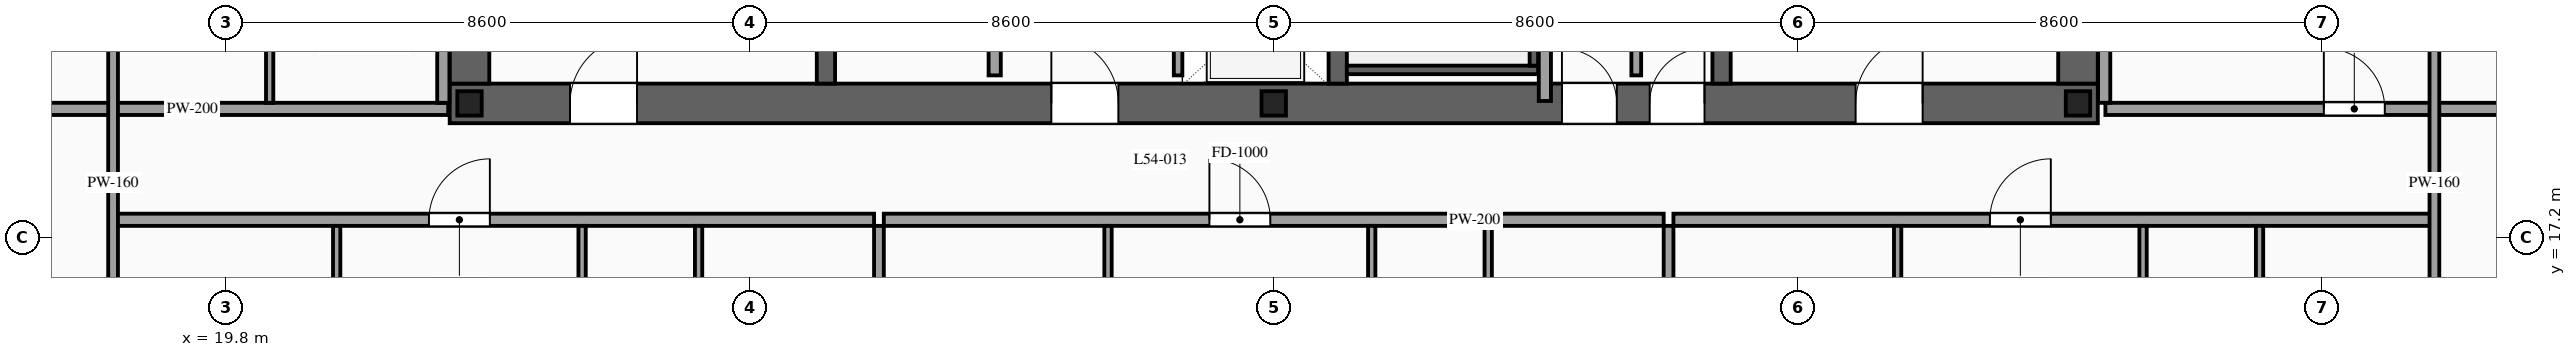
"""IFC4 building model, lengths in metres.
Left out: names, types, materials, properties, quantities, classifications, styles, units other than length and angle.
Written with IfcOpenShell. Run it as: python <this file> out.ifc"""

import sys

from ifc_helpers import new_model, si_unit, direction, frame, frame_2d, origin, origin_2d, place, context, subcontext, project, spatial, rectangle, i_section, extrude, source, transform, mapped, element, fill, save


model = new_model("IFC4")
c1 = context("Model", 3, precision=1e-05, world=origin(), true_north=direction((0.0, 1.0)))
c2 = subcontext(c1, "Body", "Model", "MODEL_VIEW")
j1 = project(units=[si_unit("LENGTHUNIT", "METRE"), si_unit("PLANEANGLEUNIT", "RADIAN")], contexts=[c1])
p1 = place(None, origin())
s1 = spatial("IfcSite", under=j1, at=p1, CompositionType="ELEMENT")
p2 = place(p1, origin())
s2 = spatial("IfcBuilding", under=s1, at=p2, CompositionType="ELEMENT")
p3 = place(p2, frame((0.0, 0.0, 205.5)))
s3 = spatial("IfcBuildingStorey", under=s2, at=p3, CompositionType="ELEMENT", Elevation=205.5)
p4 = place(p3, frame((23.475, 19.4, 0.0), z_axis=(0.0, 0.0, 1.0), x_axis=(1.0, 0.0, 0.0)))
e1 = element("IfcWall", 1, at=p4, inside=s3, PredefinedType="SHEAR", context=c2, shape_type="SweptSolid", body=[
    extrude(rectangle(XDim=27.05, YDim=0.65, at=frame_2d((13.525, 0.0))), origin(), (0.0, 0.0, 1.0), 3.5),
])
p5 = place(p4, frame((1.975, 0.0, 0.0)))
e2 = element("IfcOpeningElement", 2, at=p5, cuts=e1, PredefinedType="OPENING", context=c2, shape_type="SweptSolid", body=[
    extrude(rectangle(XDim=1.1, YDim=2.2, at=frame_2d((0.55, 1.1))), frame((0.0, 0.34, 0.0), z_axis=(0.0, -1.0, 0.0), x_axis=(1.0, 0.0, 0.0)), (0.0, 0.0, 1.0), 0.68),
])
p6 = place(p4, frame((9.875, 0.0, 0.0)))
e3 = element("IfcOpeningElement", 3, at=p6, cuts=e1, PredefinedType="OPENING", context=c2, shape_type="SweptSolid", body=[
    extrude(rectangle(XDim=1.1, YDim=2.2, at=frame_2d((0.55, 1.1))), frame((0.0, 0.34, 0.0), z_axis=(0.0, -1.0, 0.0), x_axis=(1.0, 0.0, 0.0)), (0.0, 0.0, 1.0), 0.68),
])
p7 = place(p4, frame((23.075, 0.0, 0.0)))
e4 = element("IfcOpeningElement", 4, at=p7, cuts=e1, PredefinedType="OPENING", context=c2, shape_type="SweptSolid", body=[
    extrude(rectangle(XDim=1.1, YDim=2.2, at=frame_2d((0.55, 1.1))), frame((0.0, 0.34, 0.0), z_axis=(0.0, -1.0, 0.0), x_axis=(1.0, 0.0, 0.0)), (0.0, 0.0, 1.0), 0.68),
])
p8 = place(p4, frame((19.695, 0.0, 0.0)))
e5 = element("IfcOpeningElement", 5, at=p8, cuts=e1, PredefinedType="OPENING", context=c2, shape_type="SweptSolid", body=[
    extrude(rectangle(XDim=0.9, YDim=2.15, at=frame_2d((0.45, 1.075))), frame((0.0, 0.34, 0.0), z_axis=(0.0, -1.0, 0.0), x_axis=(1.0, 0.0, 0.0)), (0.0, 0.0, 1.0), 0.68),
])
p9 = place(p4, frame((18.255, 0.0, 0.0)))
e6 = element("IfcOpeningElement", 6, at=p9, cuts=e1, PredefinedType="OPENING", context=c2, shape_type="SweptSolid", body=[
    extrude(rectangle(XDim=0.9, YDim=2.15, at=frame_2d((0.45, 1.075))), frame((0.0, 0.34, 0.0), z_axis=(0.0, -1.0, 0.0), x_axis=(1.0, 0.0, 0.0)), (0.0, 0.0, 1.0), 0.68),
])
m1 = source(origin(), c2, "Body", "SweptSolid", [
    extrude(rectangle(XDim=12.15, YDim=0.65, at=frame_2d((6.075, 0.0))), origin(), (0.0, 0.0, 1.0), 3.5),
])
for number, where, z_axis, x_axis in (
    (7, (23.8, 19.725, 0.0), (0.0, 0.0, 1.0), (0.0, 1.0, 0.0)),
    (8, (50.2, 19.725, 0.0), (0.0, 0.0, 1.0), (0.0, 1.0, 0.0)),
):
    element("IfcWall", number, at=place(p3, frame(where, z_axis=z_axis, x_axis=x_axis)), inside=s3, PredefinedType="SHEAR", context=c2, shape_type="MappedRepresentation", body=[
        mapped(m1, transform((0.0, 0.0, 0.0), scale=1.0)),
    ])
m2 = source(origin(), c2, "Body", "SweptSolid", [
    extrude(rectangle(XDim=12.15, YDim=0.3, at=frame_2d((6.075, 0.0))), origin(), (0.0, 0.0, 1.0), 3.5),
])
for number, where, z_axis, x_axis in (
    (9, (29.65, 19.725, 0.0), (0.0, 0.0, 1.0), (0.0, 1.0, 0.0)),
    (10, (38.05, 19.725, 0.0), (0.0, 0.0, 1.0), (0.0, 1.0, 0.0)),
    (11, (44.35, 19.725, 0.0), (0.0, 0.0, 1.0), (0.0, 1.0, 0.0)),
):
    element("IfcWall", number, at=place(p3, frame(where, z_axis=z_axis, x_axis=x_axis)), inside=s3, PredefinedType="SOLIDWALL", context=c2, shape_type="MappedRepresentation", body=[
        mapped(m2, transform((0.0, 0.0, 0.0), scale=1.0)),
    ])
m3 = source(origin(), c2, "Body", "SweptSolid", [
    extrude(i_section(OverallWidth=0.4, OverallDepth=0.4, WebThickness=0.013, FlangeThickness=0.021, at=origin_2d()), origin(), (0.0, 0.0, 1.0), 3.5),
])
for number, where, z_axis, x_axis in (
    (12, (23.8, 19.4, 0.0), (0.0, 0.0, 1.0), (1.0, 0.0, 0.0)),
    (13, (37.0, 19.4, 0.0), (0.0, 0.0, 1.0), (1.0, 0.0, 0.0)),
    (14, (50.2, 19.4, 0.0), (0.0, 0.0, 1.0), (1.0, 0.0, 0.0)),
):
    element("IfcColumn", number, at=place(p3, frame(where, z_axis=z_axis, x_axis=x_axis)), inside=s3, PredefinedType="COLUMN", context=c2, shape_type="MappedRepresentation", body=[
        mapped(m3, transform((0.0, 0.0, 0.0), scale=1.0)),
    ])
p10 = place(p3, frame((35.43, 19.86, 0.0), z_axis=(0.0, 0.0, 1.0), x_axis=(0.0, 1.0, 0.0)))
e15 = element("IfcWall", 15, at=p10, inside=s3, PredefinedType="SOLIDWALL", context=c2, shape_type="SweptSolid", body=[
    extrude(rectangle(XDim=2.04, YDim=0.14, at=frame_2d((1.02, 0.0))), origin(), (0.0, 0.0, 1.0), 3.28),
])
p11 = place(p10, frame((0.47, 0.0, 0.0)))
e16 = element("IfcOpeningElement", 16, at=p11, cuts=e15, PredefinedType="OPENING", context=c2, shape_type="SweptSolid", body=[
    extrude(rectangle(XDim=1.1, YDim=2.2, at=frame_2d((0.55, 1.1))), frame((0.0, 0.085, 0.0), z_axis=(0.0, -1.0, 0.0), x_axis=(1.0, 0.0, 0.0)), (0.0, 0.0, 1.0), 0.17),
])
m4 = source(origin(), c2, "Body", "SweptSolid", [
    extrude(rectangle(XDim=3.14, YDim=0.14, at=frame_2d((1.57, 0.0))), origin(), (0.0, 0.0, 1.0), 3.28),
])
p12 = place(p3, frame((38.2, 19.95, 0.0), z_axis=(0.0, 0.0, 1.0), x_axis=(1.0, 0.0, 0.0)))
e17 = element("IfcWall", 17, at=p12, inside=s3, PredefinedType="SOLIDWALL", context=c2, shape_type="MappedRepresentation", body=[
    mapped(m4, transform((0.0, 0.0, 0.0), scale=1.0)),
])
m5 = source(origin(), c2, "Body", "SweptSolid", [
    extrude(rectangle(XDim=8.94, YDim=0.14, at=frame_2d((4.47, 0.0))), origin(), (0.0, 0.0, 1.0), 3.28),
])
p13 = place(p3, frame((41.27, 20.02, 0.0), z_axis=(0.0, 0.0, 1.0), x_axis=(0.0, 1.0, 0.0)))
e18 = element("IfcWall", 18, at=p13, inside=s3, PredefinedType="SOLIDWALL", context=c2, shape_type="MappedRepresentation", body=[
    mapped(m5, transform((0.0, 0.0, 0.0), scale=1.0)),
])
p14 = place(p3, frame((32.42, 19.86, 0.0), z_axis=(0.0, 0.0, 1.0), x_axis=(0.0, 1.0, 0.0)))
e19 = element("IfcWall", 19, at=p14, inside=s3, PredefinedType="PARTITIONING", context=c2, shape_type="SweptSolid", body=[
    extrude(rectangle(XDim=11.88, YDim=0.2, at=frame_2d((5.94, 0.0))), origin(), (0.0, 0.0, 1.0), 3.28),
])
p15 = place(p14, frame((5.49, 0.0, 0.0)))
e20 = element("IfcOpeningElement", 20, at=p15, cuts=e19, PredefinedType="OPENING", context=c2, shape_type="SweptSolid", body=[
    extrude(rectangle(XDim=0.9, YDim=2.15, at=frame_2d((0.45, 1.075))), frame((0.0, 0.115, 0.0), z_axis=(0.0, -1.0, 0.0), x_axis=(1.0, 0.0, 0.0)), (0.0, 0.0, 1.0), 0.23),
])
m6 = source(origin(), c2, "Body", "SweptSolid", [
    extrude(rectangle(XDim=1.34, YDim=0.16, at=frame_2d((0.67, 0.0))), origin(), (0.0, 0.0, 1.0), 3.28),
])
p16 = place(p3, frame((42.95, 19.86, 0.0), z_axis=(0.0, 0.0, 1.0), x_axis=(0.0, 1.0, 0.0)))
e21 = element("IfcWall", 21, at=p16, inside=s3, PredefinedType="PARTITIONING", context=c2, shape_type="MappedRepresentation", body=[
    mapped(m6, transform((0.0, 0.0, 0.0), scale=1.0)),
])
m7 = source(origin(), c2, "Body", "SweptSolid", [
    extrude(rectangle(XDim=12.72, YDim=0.2, at=frame_2d((6.36, 0.0))), origin(), (0.0, 0.0, 1.0), 3.28),
])
p17 = place(p3, frame((41.45, 19.44, 0.0), z_axis=(0.0, 0.0, 1.0), x_axis=(0.0, 1.0, 0.0)))
e22 = element("IfcWall", 22, at=p17, inside=s3, PredefinedType="PARTITIONING", context=c2, shape_type="MappedRepresentation", body=[
    mapped(m7, transform((0.0, 0.0, 0.0), scale=1.0)),
])
p18 = place(p3, frame((17.94, 17.49, 0.0), z_axis=(0.0, 0.0, 1.0), x_axis=(1.0, 0.0, 0.0)))
e23 = element("IfcWall", 23, at=p18, inside=s3, PredefinedType="PARTITIONING", context=c2, shape_type="SweptSolid", body=[
    extrude(rectangle(XDim=12.5, YDim=0.2, at=frame_2d((6.25, 0.0))), origin(), (0.0, 0.0, 1.0), 3.28),
])
p19 = place(p18, frame((5.194, 0.0, 0.0)))
e24 = element("IfcOpeningElement", 24, at=p19, cuts=e23, PredefinedType="OPENING", context=c2, shape_type="SweptSolid", body=[
    extrude(rectangle(XDim=1.0, YDim=2.2, at=frame_2d((0.5, 1.1))), frame((0.0, 0.115, 0.0), z_axis=(0.0, -1.0, 0.0), x_axis=(1.0, 0.0, 0.0)), (0.0, 0.0, 1.0), 0.23),
])
m8 = source(origin(), c2, "Body", "SweptSolid", [
    extrude(rectangle(XDim=13.54, YDim=0.16, at=frame_2d((6.77, 0.0))), origin(), (0.0, 0.0, 1.0), 3.28),
])
p20 = place(p3, frame((30.52, 3.85, 0.0), z_axis=(0.0, 0.0, 1.0), x_axis=(0.0, 1.0, 0.0)))
e25 = element("IfcWall", 25, at=p20, inside=s3, PredefinedType="PARTITIONING", context=c2, shape_type="MappedRepresentation", body=[
    mapped(m8, transform((0.0, 0.0, 0.0), scale=1.0)),
])
m9 = source(origin(), c2, "Body", "SweptSolid", [
    extrude(rectangle(XDim=5.61, YDim=0.12, at=frame_2d((2.805, 0.0))), origin(), (0.0, 0.0, 1.0), 3.28),
])
p21 = place(p3, frame((21.62, 11.78, 0.0), z_axis=(0.0, 0.0, 1.0), x_axis=(0.0, 1.0, 0.0)))
e26 = element("IfcWall", 26, at=p21, inside=s3, PredefinedType="PARTITIONING", context=c2, shape_type="MappedRepresentation", body=[
    mapped(m9, transform((0.0, 0.0, 0.0), scale=1.0)),
])
p22 = place(p3, frame((27.56, 11.78, 0.0), z_axis=(0.0, 0.0, 1.0), x_axis=(0.0, 1.0, 0.0)))
e27 = element("IfcWall", 27, at=p22, inside=s3, PredefinedType="PARTITIONING", context=c2, shape_type="SweptSolid", body=[
    extrude(rectangle(XDim=5.61, YDim=0.12, at=frame_2d((2.805, 0.0))), origin(), (0.0, 0.0, 1.0), 3.28),
])
p23 = place(p22, frame((2.38, 0.0, 0.0)))
e28 = element("IfcOpeningElement", 28, at=p23, cuts=e27, PredefinedType="OPENING", context=c2, shape_type="SweptSolid", body=[
    extrude(rectangle(XDim=0.85, YDim=2.1, at=frame_2d((0.425, 1.05))), frame((0.0, 0.075, 0.0), z_axis=(0.0, -1.0, 0.0), x_axis=(1.0, 0.0, 0.0)), (0.0, 0.0, 1.0), 0.15),
])
p24 = place(p3, frame((25.648, 11.78, 0.0), z_axis=(0.0, 0.0, 1.0), x_axis=(0.0, 1.0, 0.0)))
e29 = element("IfcWall", 29, at=p24, inside=s3, PredefinedType="PARTITIONING", context=c2, shape_type="SweptSolid", body=[
    extrude(rectangle(XDim=5.61, YDim=0.12, at=frame_2d((2.805, 0.0))), origin(), (0.0, 0.0, 1.0), 3.28),
])
p25 = place(p24, frame((2.38, 0.0, 0.0)))
e30 = element("IfcOpeningElement", 30, at=p25, cuts=e29, PredefinedType="OPENING", context=c2, shape_type="SweptSolid", body=[
    extrude(rectangle(XDim=0.85, YDim=2.1, at=frame_2d((0.425, 1.05))), frame((0.0, 0.075, 0.0), z_axis=(0.0, -1.0, 0.0), x_axis=(1.0, 0.0, 0.0)), (0.0, 0.0, 1.0), 0.15),
])
p26 = place(p3, frame((30.6, 17.49, 0.0), z_axis=(0.0, 0.0, 1.0), x_axis=(1.0, 0.0, 0.0)))
e31 = element("IfcWall", 31, at=p26, inside=s3, PredefinedType="PARTITIONING", context=c2, shape_type="SweptSolid", body=[
    extrude(rectangle(XDim=12.8, YDim=0.2, at=frame_2d((6.4, 0.0))), origin(), (0.0, 0.0, 1.0), 3.28),
])
p27 = place(p26, frame((5.344, 0.0, 0.0)))
e32 = element("IfcOpeningElement", 32, at=p27, cuts=e31, PredefinedType="OPENING", context=c2, shape_type="SweptSolid", body=[
    extrude(rectangle(XDim=1.0, YDim=2.2, at=frame_2d((0.5, 1.1))), frame((0.0, 0.115, 0.0), z_axis=(0.0, -1.0, 0.0), x_axis=(1.0, 0.0, 0.0)), (0.0, 0.0, 1.0), 0.23),
])
p28 = place(p3, frame((43.48, 3.85, 0.0), z_axis=(0.0, 0.0, 1.0), x_axis=(0.0, 1.0, 0.0)))
e33 = element("IfcWall", 33, at=p28, inside=s3, PredefinedType="PARTITIONING", context=c2, shape_type="MappedRepresentation", body=[
    mapped(m8, transform((0.0, 0.0, 0.0), scale=1.0)),
])
p29 = place(p3, frame((34.28, 11.78, 0.0), z_axis=(0.0, 0.0, 1.0), x_axis=(0.0, 1.0, 0.0)))
e34 = element("IfcWall", 34, at=p29, inside=s3, PredefinedType="PARTITIONING", context=c2, shape_type="MappedRepresentation", body=[
    mapped(m9, transform((0.0, 0.0, 0.0), scale=1.0)),
])
p30 = place(p3, frame((40.52, 11.78, 0.0), z_axis=(0.0, 0.0, 1.0), x_axis=(0.0, 1.0, 0.0)))
e35 = element("IfcWall", 35, at=p30, inside=s3, PredefinedType="PARTITIONING", context=c2, shape_type="SweptSolid", body=[
    extrude(rectangle(XDim=5.61, YDim=0.12, at=frame_2d((2.805, 0.0))), origin(), (0.0, 0.0, 1.0), 3.28),
])
p31 = place(p30, frame((2.38, 0.0, 0.0)))
e36 = element("IfcOpeningElement", 36, at=p31, cuts=e35, PredefinedType="OPENING", context=c2, shape_type="SweptSolid", body=[
    extrude(rectangle(XDim=0.85, YDim=2.1, at=frame_2d((0.425, 1.05))), frame((0.0, 0.075, 0.0), z_axis=(0.0, -1.0, 0.0), x_axis=(1.0, 0.0, 0.0)), (0.0, 0.0, 1.0), 0.15),
])
p32 = place(p3, frame((38.608, 11.78, 0.0), z_axis=(0.0, 0.0, 1.0), x_axis=(0.0, 1.0, 0.0)))
e37 = element("IfcWall", 37, at=p32, inside=s3, PredefinedType="PARTITIONING", context=c2, shape_type="SweptSolid", body=[
    extrude(rectangle(XDim=5.61, YDim=0.12, at=frame_2d((2.805, 0.0))), origin(), (0.0, 0.0, 1.0), 3.28),
])
p33 = place(p32, frame((2.38, 0.0, 0.0)))
e38 = element("IfcOpeningElement", 38, at=p33, cuts=e37, PredefinedType="OPENING", context=c2, shape_type="SweptSolid", body=[
    extrude(rectangle(XDim=0.85, YDim=2.1, at=frame_2d((0.425, 1.05))), frame((0.0, 0.075, 0.0), z_axis=(0.0, -1.0, 0.0), x_axis=(1.0, 0.0, 0.0)), (0.0, 0.0, 1.0), 0.15),
])
p34 = place(p3, frame((43.56, 17.49, 0.0), z_axis=(0.0, 0.0, 1.0), x_axis=(1.0, 0.0, 0.0)))
e39 = element("IfcWall", 39, at=p34, inside=s3, PredefinedType="PARTITIONING", context=c2, shape_type="SweptSolid", body=[
    extrude(rectangle(XDim=12.5, YDim=0.2, at=frame_2d((6.25, 0.0))), origin(), (0.0, 0.0, 1.0), 3.28),
])
p35 = place(p34, frame((5.194, 0.0, 0.0)))
e40 = element("IfcOpeningElement", 40, at=p35, cuts=e39, PredefinedType="OPENING", context=c2, shape_type="SweptSolid", body=[
    extrude(rectangle(XDim=1.0, YDim=2.2, at=frame_2d((0.5, 1.1))), frame((0.0, 0.115, 0.0), z_axis=(0.0, -1.0, 0.0), x_axis=(1.0, 0.0, 0.0)), (0.0, 0.0, 1.0), 0.23),
])
p36 = place(p3, frame((47.24, 11.78, 0.0), z_axis=(0.0, 0.0, 1.0), x_axis=(0.0, 1.0, 0.0)))
e41 = element("IfcWall", 41, at=p36, inside=s3, PredefinedType="PARTITIONING", context=c2, shape_type="MappedRepresentation", body=[
    mapped(m9, transform((0.0, 0.0, 0.0), scale=1.0)),
])
p37 = place(p3, frame((53.18, 11.78, 0.0), z_axis=(0.0, 0.0, 1.0), x_axis=(0.0, 1.0, 0.0)))
e42 = element("IfcWall", 42, at=p37, inside=s3, PredefinedType="PARTITIONING", context=c2, shape_type="SweptSolid", body=[
    extrude(rectangle(XDim=5.61, YDim=0.12, at=frame_2d((2.805, 0.0))), origin(), (0.0, 0.0, 1.0), 3.28),
])
p38 = place(p37, frame((2.38, 0.0, 0.0)))
e43 = element("IfcOpeningElement", 43, at=p38, cuts=e42, PredefinedType="OPENING", context=c2, shape_type="SweptSolid", body=[
    extrude(rectangle(XDim=0.85, YDim=2.1, at=frame_2d((0.425, 1.05))), frame((0.0, 0.075, 0.0), z_axis=(0.0, -1.0, 0.0), x_axis=(1.0, 0.0, 0.0)), (0.0, 0.0, 1.0), 0.15),
])
p39 = place(p3, frame((51.268, 11.78, 0.0), z_axis=(0.0, 0.0, 1.0), x_axis=(0.0, 1.0, 0.0)))
e44 = element("IfcWall", 44, at=p39, inside=s3, PredefinedType="PARTITIONING", context=c2, shape_type="SweptSolid", body=[
    extrude(rectangle(XDim=5.61, YDim=0.12, at=frame_2d((2.805, 0.0))), origin(), (0.0, 0.0, 1.0), 3.28),
])
p40 = place(p39, frame((2.38, 0.0, 0.0)))
e45 = element("IfcOpeningElement", 45, at=p40, cuts=e44, PredefinedType="OPENING", context=c2, shape_type="SweptSolid", body=[
    extrude(rectangle(XDim=0.85, YDim=2.1, at=frame_2d((0.425, 1.05))), frame((0.0, 0.075, 0.0), z_axis=(0.0, -1.0, 0.0), x_axis=(1.0, 0.0, 0.0)), (0.0, 0.0, 1.0), 0.15),
])
m10 = source(origin(), c2, "Body", "SweptSolid", [
    extrude(rectangle(XDim=8.4, YDim=0.2, at=frame_2d((4.2, 0.0))), origin(), (0.0, 0.0, 1.0), 2.775),
])
p41 = place(p3, frame((15.05, 19.31, 0.0), z_axis=(0.0, 0.0, 1.0), x_axis=(1.0, 0.0, 0.0)))
e46 = element("IfcWall", 46, at=p41, inside=s3, PredefinedType="PARTITIONING", context=c2, shape_type="MappedRepresentation", body=[
    mapped(m10, transform((0.0, 0.0, 0.0), scale=1.0)),
])
m11 = source(origin(), c2, "Body", "SweptSolid", [
    extrude(rectangle(XDim=12.78, YDim=0.2, at=frame_2d((6.39, 0.0))), origin(), (0.0, 0.0, 1.0), 3.28),
])
p42 = place(p3, frame((23.37, 19.41, 0.0), z_axis=(0.0, 0.0, 1.0), x_axis=(0.0, 1.0, 0.0)))
e47 = element("IfcWall", 47, at=p42, inside=s3, PredefinedType="PARTITIONING", context=c2, shape_type="MappedRepresentation", body=[
    mapped(m11, transform((0.0, 0.0, 0.0), scale=1.0)),
])
p43 = place(p3, frame((20.52, 19.41, 0.0), z_axis=(0.0, 0.0, 1.0), x_axis=(0.0, 1.0, 0.0)))
e48 = element("IfcWall", 48, at=p43, inside=s3, PredefinedType="PARTITIONING", context=c2, shape_type="SweptSolid", body=[
    extrude(rectangle(XDim=5.623, YDim=0.12, at=frame_2d((2.812, 0.0))), origin(), (0.0, 0.0, 1.0), 3.28),
])
p44 = place(p43, frame((2.386, 0.0, 0.0)))
e49 = element("IfcOpeningElement", 49, at=p44, cuts=e48, PredefinedType="OPENING", context=c2, shape_type="SweptSolid", body=[
    extrude(rectangle(XDim=0.85, YDim=2.1, at=frame_2d((0.425, 1.05))), frame((0.0, 0.075, 0.0), z_axis=(0.0, -1.0, 0.0), x_axis=(1.0, 0.0, 0.0)), (0.0, 0.0, 1.0), 0.15),
])
p45 = place(p3, frame((50.65, 19.31, 0.0), z_axis=(0.0, 0.0, 1.0), x_axis=(1.0, 0.0, 0.0)))
e50 = element("IfcWall", 50, at=p45, inside=s3, PredefinedType="PARTITIONING", context=c2, shape_type="SweptSolid", body=[
    extrude(rectangle(XDim=8.3, YDim=0.2, at=frame_2d((4.15, 0.0))), origin(), (0.0, 0.0, 1.0), 2.775),
])
p46 = place(p45, frame((3.585, 0.0, 0.0)))
e51 = element("IfcOpeningElement", 51, at=p46, cuts=e50, PredefinedType="OPENING", context=c2, shape_type="SweptSolid", body=[
    extrude(rectangle(XDim=1.0, YDim=2.2, at=frame_2d((0.5, 1.1))), frame((0.0, 0.115, 0.0), z_axis=(0.0, -1.0, 0.0), x_axis=(1.0, 0.0, 0.0)), (0.0, 0.0, 1.0), 0.23),
])
m12 = source(origin(), c2, "Body", "SweptSolid", [
    extrude(rectangle(XDim=6.29, YDim=0.2, at=frame_2d((3.145, 0.0))), origin(), (0.0, 0.0, 1.0), 3.28),
])
p47 = place(p3, frame((50.63, 19.41, 0.0), z_axis=(0.0, 0.0, 1.0), x_axis=(0.0, 1.0, 0.0)))
e52 = element("IfcWall", 52, at=p47, inside=s3, PredefinedType="PARTITIONING", context=c2, shape_type="MappedRepresentation", body=[
    mapped(m12, transform((0.0, 0.0, 0.0), scale=1.0)),
])
m13 = source(origin(), c2, "Body", "SweptSolid", [
    extrude(rectangle(XDim=28.19, YDim=0.16, at=frame_2d((14.095, 0.0))), origin(), (0.0, 0.0, 1.0), 3.28),
])
for number, where, z_axis, x_axis in (
    (53, (17.95, 4.0, 0.0), (0.0, 0.0, 1.0), (0.0, 1.0, 0.0)),
    (54, (56.05, 4.0, 0.0), (0.0, 0.0, 1.0), (0.0, 1.0, 0.0)),
):
    element("IfcWall", number, at=place(p3, frame(where, z_axis=z_axis, x_axis=x_axis)), inside=s3, PredefinedType="PARTITIONING", context=c2, shape_type="MappedRepresentation", body=[
        mapped(m13, transform((0.0, 0.0, 0.0), scale=1.0)),
    ])
m14 = source(origin(), c2, "Body", "SweptSolid", [
    extrude(rectangle(XDim=1.1, YDim=2.2, at=frame_2d((0.55, 1.1))), frame((0.0, 0.025, 0.0), z_axis=(0.0, -1.0, 0.0), x_axis=(1.0, 0.0, 0.0)), (0.0, 0.0, 1.0), 0.05),
])
p48 = place(p5, origin())
e55 = element("IfcDoor", 55, at=p48, inside=s3, OperationType="SINGLE_SWING_RIGHT", PredefinedType="DOOR", context=c2, shape_type="MappedRepresentation", body=[
    mapped(m14, transform((0.0, 0.0, 0.0), scale=1.0)),
])
fill(e2, e55)
p49 = place(p6, origin())
e56 = element("IfcDoor", 56, at=p49, inside=s3, OperationType="SINGLE_SWING_LEFT", PredefinedType="DOOR", context=c2, shape_type="MappedRepresentation", body=[
    mapped(m14, transform((0.0, 0.0, 0.0), scale=1.0)),
])
fill(e3, e56)
p50 = place(p7, origin())
e57 = element("IfcDoor", 57, at=p50, inside=s3, OperationType="SINGLE_SWING_RIGHT", PredefinedType="DOOR", context=c2, shape_type="MappedRepresentation", body=[
    mapped(m14, transform((0.0, 0.0, 0.0), scale=1.0)),
])
fill(e4, e57)
m15 = source(origin(), c2, "Body", "SweptSolid", [
    extrude(rectangle(XDim=0.9, YDim=2.15, at=frame_2d((0.45, 1.075))), frame((0.0, 0.025, 0.0), z_axis=(0.0, -1.0, 0.0), x_axis=(1.0, 0.0, 0.0)), (0.0, 0.0, 1.0), 0.05),
])
p51 = place(p8, origin())
e58 = element("IfcDoor", 58, at=p51, inside=s3, OperationType="SINGLE_SWING_RIGHT", PredefinedType="DOOR", context=c2, shape_type="MappedRepresentation", body=[
    mapped(m15, transform((0.0, 0.0, 0.0), scale=1.0)),
])
fill(e5, e58)
p52 = place(p9, origin())
e59 = element("IfcDoor", 59, at=p52, inside=s3, OperationType="SINGLE_SWING_LEFT", PredefinedType="DOOR", context=c2, shape_type="MappedRepresentation", body=[
    mapped(m15, transform((0.0, 0.0, 0.0), scale=1.0)),
])
fill(e6, e59)
m16 = source(origin(), c2, "Body", "SweptSolid", [
    extrude(rectangle(XDim=1.0, YDim=2.2, at=frame_2d((0.5, 1.1))), frame((0.0, 0.025, 0.0), z_axis=(0.0, -1.0, 0.0), x_axis=(1.0, 0.0, 0.0)), (0.0, 0.0, 1.0), 0.05),
])
p53 = place(p19, origin())
e60 = element("IfcDoor", 60, at=p53, inside=s3, OperationType="SINGLE_SWING_RIGHT", PredefinedType="DOOR", context=c2, shape_type="MappedRepresentation", body=[
    mapped(m16, transform((0.0, 0.0, 0.0), scale=1.0)),
])
fill(e24, e60)
p54 = place(p27, origin())
e61 = element("IfcDoor", 61, at=p54, inside=s3, OperationType="SINGLE_SWING_LEFT", PredefinedType="DOOR", context=c2, shape_type="MappedRepresentation", body=[
    mapped(m16, transform((0.0, 0.0, 0.0), scale=1.0)),
])
fill(e32, e61)
p55 = place(p35, origin())
e62 = element("IfcDoor", 62, at=p55, inside=s3, OperationType="SINGLE_SWING_RIGHT", PredefinedType="DOOR", context=c2, shape_type="MappedRepresentation", body=[
    mapped(m16, transform((0.0, 0.0, 0.0), scale=1.0)),
])
fill(e40, e62)
p56 = place(p46, origin())
e63 = element("IfcDoor", 63, at=p56, inside=s3, OperationType="SINGLE_SWING_LEFT", PredefinedType="DOOR", context=c2, shape_type="MappedRepresentation", body=[
    mapped(m16, transform((0.0, 0.0, 0.0), scale=1.0)),
])
fill(e51, e63)
save(model, sys.argv[1])
